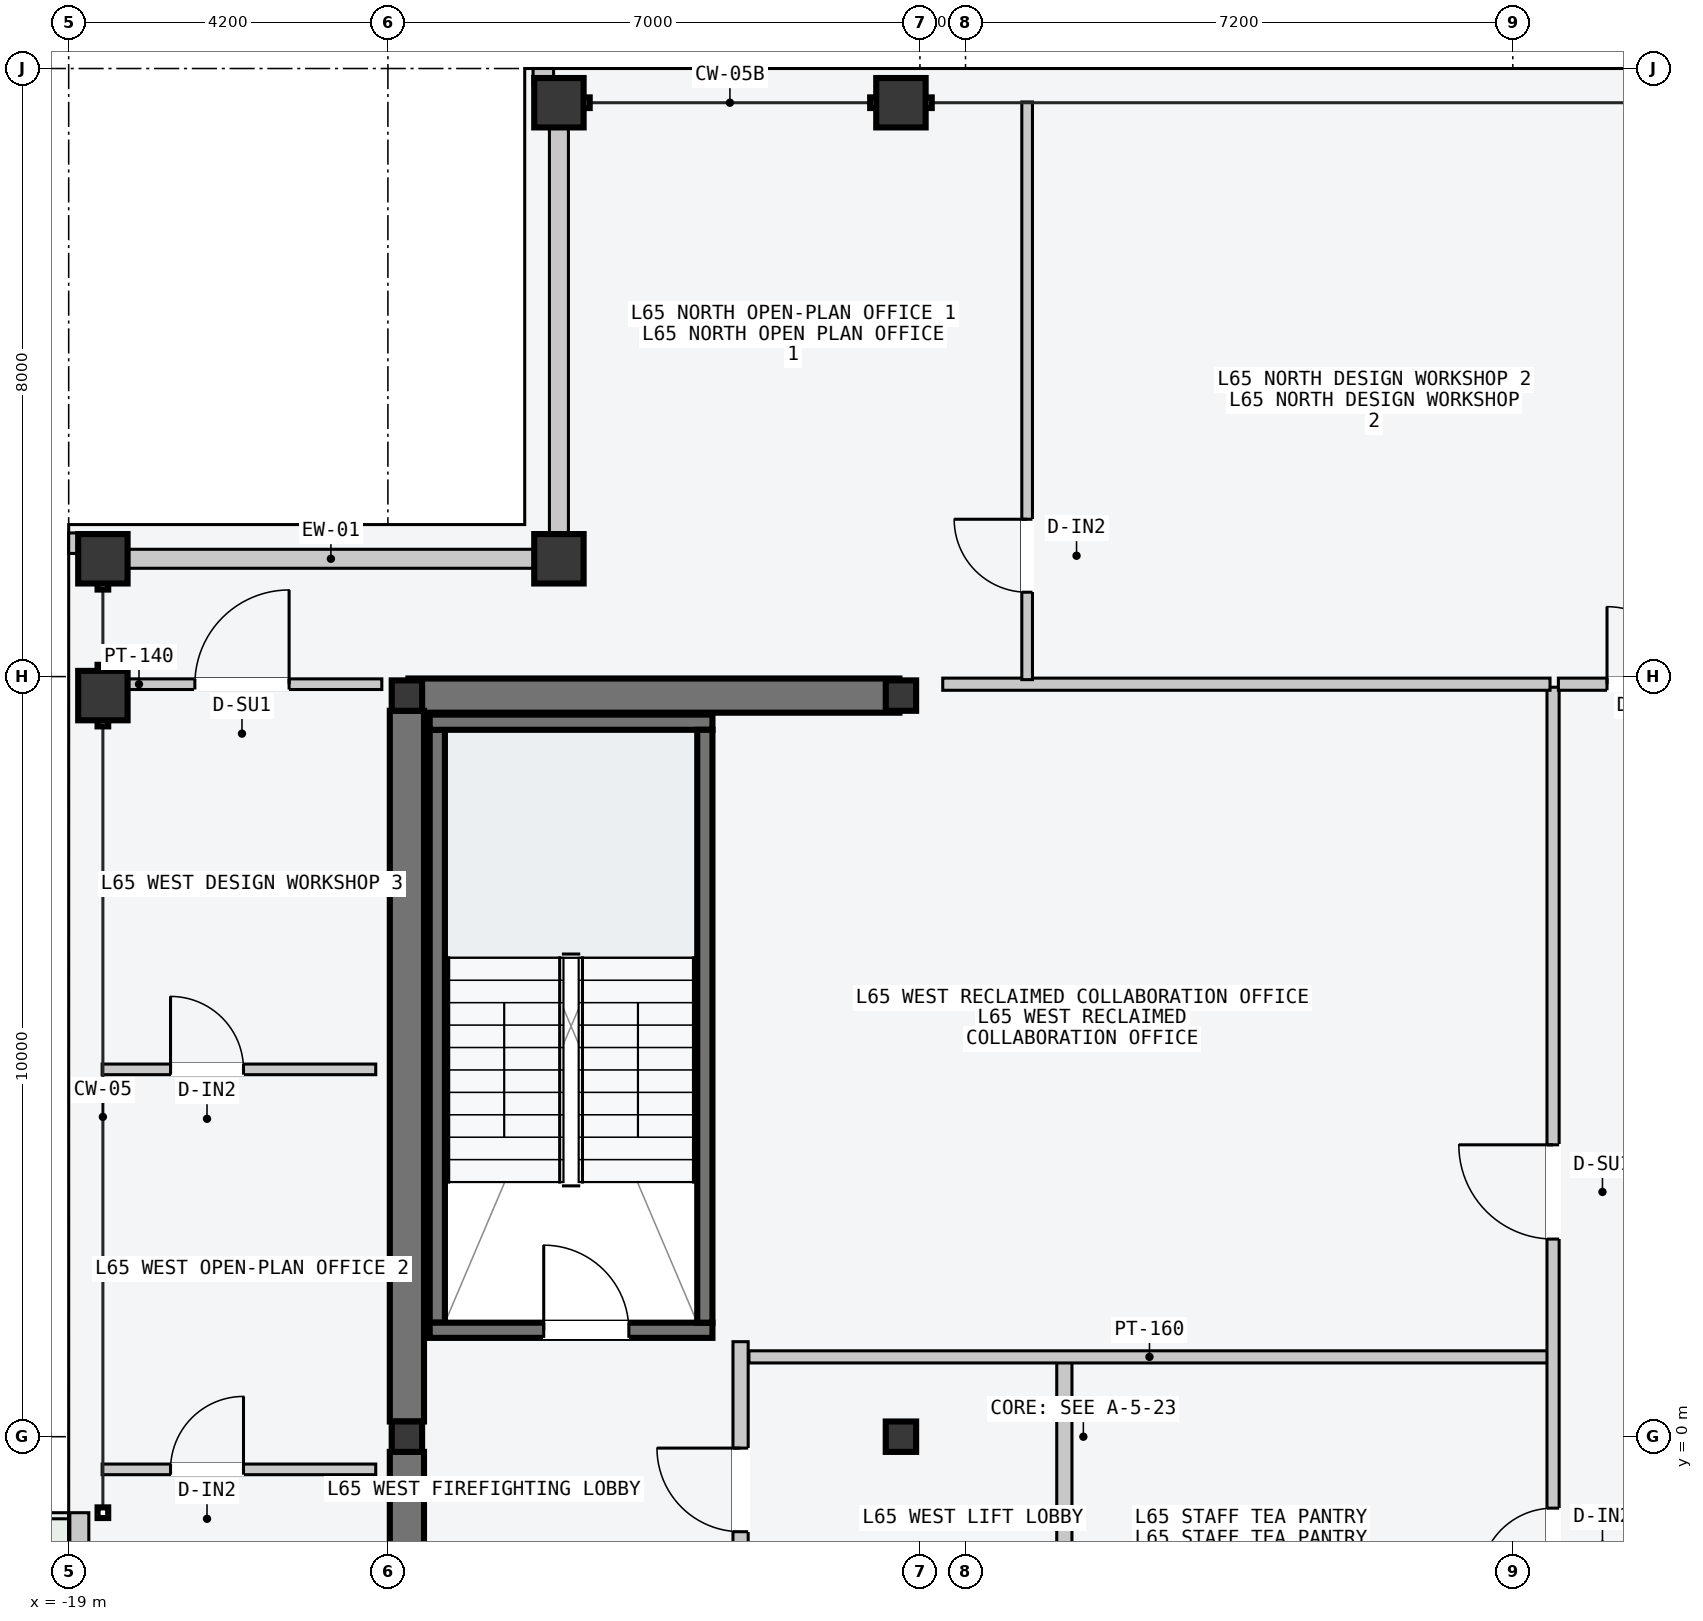
"""IFC4 building model, lengths in metres.
Left out: names, types, materials, properties, quantities, classifications, styles, units other than length and angle.
Written with IfcOpenShell. Run it as: python <this file> out.ifc"""

import sys

from ifc_helpers import new_model, si_unit, direction, frame, frame_2d, origin, origin_2d, place, context, subcontext, project, spatial, rectangle, hollow_rectangle, i_section, extrude, element, fill, save


model = new_model("IFC4")
c1 = context("Model", 3, precision=1e-05, world=origin(), true_north=direction((0.0, 1.0)))
c2 = subcontext(c1, "Body", "Model", "MODEL_VIEW")
j1 = project(units=[si_unit("LENGTHUNIT", "METRE"), si_unit("PLANEANGLEUNIT", "RADIAN")], contexts=[c1])
p1 = place(None, origin())
s1 = spatial("IfcSite", under=j1, at=p1, CompositionType="ELEMENT")
p2 = place(p1, origin())
s2 = spatial("IfcBuilding", under=s1, at=p2, CompositionType="ELEMENT")
p3 = place(p2, frame((0.0, 0.0, 247.2)))
s3 = spatial("IfcBuildingStorey", under=s2, at=p3, CompositionType="ELEMENT", Elevation=247.2)
p4 = place(p3, frame((-14.53, 9.75, -0.2), z_axis=(0.0, 0.0, 1.0), x_axis=(1.0, 0.0, 0.0)))
e1 = element("IfcWall", 1, at=p4, inside=s3, PredefinedType="SHEAR", context=c2, shape_type="SweptSolid", body=[
    extrude(rectangle(XDim=6.46, YDim=0.45, at=frame_2d((3.23, 0.0))), origin(), (0.0, 0.0, 1.0), 3.6),
])
for number, where, z_axis, x_axis in (
    (2, (-14.55, -9.55, -0.2), (0.0, 0.0, 1.0), (0.0, 1.0, 0.0)),
    (3, (-14.55, 0.2, -0.2), (0.0, 0.0, 1.0), (0.0, 1.0, 0.0)),
):
    element("IfcWall", number, at=place(p3, frame(where, z_axis=z_axis, x_axis=x_axis)), inside=s3, PredefinedType="SHEAR", context=c2, shape_type="SweptSolid", body=[
        extrude(rectangle(XDim=9.35, YDim=0.45, at=frame_2d((4.675, 0.0))), origin(), (0.0, 0.0, 1.0), 3.6),
    ])
p5 = place(p3, frame((-14.15, 1.5, -0.2), z_axis=(0.0, 0.0, 1.0), x_axis=(0.0, 1.0, 0.0)))
e4 = element("IfcWall", 4, at=p5, inside=s3, PredefinedType="SOLIDWALL", context=c2, shape_type="SweptSolid", body=[
    extrude(rectangle(XDim=7.8, YDim=0.2, at=frame_2d((3.9, 0.0))), origin(), (0.0, 0.0, 1.0), 3.6),
])
p6 = place(p3, frame((-14.25, 1.4, -0.2), z_axis=(0.0, 0.0, 1.0), x_axis=(1.0, 0.0, 0.0)))
e5 = element("IfcWall", 5, at=p6, inside=s3, PredefinedType="SOLIDWALL", context=c2, shape_type="SweptSolid", body=[
    extrude(rectangle(XDim=3.72, YDim=0.2, at=frame_2d((1.86, 0.0))), origin(), (0.0, 0.0, 1.0), 3.6),
])
p7 = place(p6, frame((1.5, 0.0, 0.2)))
e6 = element("IfcOpeningElement", 6, at=p7, cuts=e5, PredefinedType="OPENING", context=c2, shape_type="SweptSolid", body=[
    extrude(rectangle(XDim=1.12, YDim=2.18, at=frame_2d((0.56, 1.09))), frame((0.0, 0.11, 0.0), z_axis=(0.0, -1.0, 0.0), x_axis=(1.0, 0.0, 0.0)), (0.0, 0.0, 1.0), 0.22),
])
p8 = place(p3, frame((-14.25, 9.4, -0.2), z_axis=(0.0, 0.0, 1.0), x_axis=(1.0, 0.0, 0.0)))
e7 = element("IfcWall", 7, at=p8, inside=s3, PredefinedType="SOLIDWALL", context=c2, shape_type="SweptSolid", body=[
    extrude(rectangle(XDim=3.72, YDim=0.2, at=frame_2d((1.86, 0.0))), origin(), (0.0, 0.0, 1.0), 3.6),
])
p9 = place(p3, frame((-10.63, 1.5, -0.2), z_axis=(0.0, 0.0, 1.0), x_axis=(0.0, 1.0, 0.0)))
e8 = element("IfcWall", 8, at=p9, inside=s3, PredefinedType="SOLIDWALL", context=c2, shape_type="SweptSolid", body=[
    extrude(rectangle(XDim=7.8, YDim=0.2, at=frame_2d((3.9, 0.0))), origin(), (0.0, 0.0, 1.0), 3.6),
])
for number, where, z_axis, x_axis in (
    (9, (-14.55, 0.0, 0.0), (0.0, 0.0, 1.0), (1.0, 0.0, 0.0)),
    (10, (-14.55, 9.75, 0.0), (0.0, 0.0, 1.0), (1.0, 0.0, 0.0)),
    (11, (-8.05, 0.0, 0.0), (0.0, 0.0, 1.0), (1.0, 0.0, 0.0)),
    (12, (-8.05, 9.75, 0.0), (0.0, 0.0, 1.0), (1.0, 0.0, 0.0)),
):
    element("IfcColumn", number, at=place(p3, frame(where, z_axis=z_axis, x_axis=x_axis)), inside=s3, PredefinedType="COLUMN", context=c2, shape_type="SweptSolid", body=[
        extrude(i_section(OverallWidth=0.4, OverallDepth=0.4, WebThickness=0.013, FlangeThickness=0.021, at=origin_2d()), origin(), (0.0, 0.0, 1.0), 3.6),
    ])
for number, where, z_axis, x_axis in (
    (13, (-12.55, 17.55, 0.0), (0.0, 0.0, 1.0), (1.0, 0.0, 0.0)),
    (14, (-8.05, 17.55, 0.0), (0.0, 0.0, 1.0), (1.0, 0.0, 0.0)),
    (15, (-18.55, 9.75, 0.0), (0.0, 0.0, 1.0), (0.0, 1.0, 0.0)),
    (16, (-18.55, 11.55, 0.0), (0.0, 0.0, 1.0), (0.0, 1.0, 0.0)),
    (17, (-12.55, 11.55, 0.0), (0.0, 0.0, 1.0), (1.0, 0.0, 0.0)),
):
    element("IfcColumn", number, at=place(p3, frame(where, z_axis=z_axis, x_axis=x_axis)), inside=s3, PredefinedType="COLUMN", context=c2, shape_type="SweptSolid", body=[
        extrude(hollow_rectangle(XDim=0.65, YDim=0.65, WallThickness=0.028, at=origin_2d()), origin(), (0.0, 0.0, 1.0), 3.6),
    ])
p10 = place(p3, frame((-18.86, -9.405, 0.0), z_axis=(0.0, 0.0, 1.0), x_axis=(0.0, 1.0, 0.0)))
e18 = element("IfcWall", 18, at=p10, inside=s3, PredefinedType="STANDARD", context=c2, shape_type="SweptSolid", body=[
    extrude(rectangle(XDim=8.405, YDim=0.25, at=frame_2d((4.203, 0.0))), origin(), (0.0, 0.0, 1.0), 3.4),
])
p11 = place(p10, frame((5.605, 0.0, 0.0)))
e19 = element("IfcOpeningElement", 19, at=p11, cuts=e18, PredefinedType="OPENING", context=c2, shape_type="SweptSolid", body=[
    extrude(rectangle(XDim=1.6, YDim=2.2, at=frame_2d((0.8, 1.1))), frame((0.0, 0.135, 0.0), z_axis=(0.0, -1.0, 0.0), x_axis=(1.0, 0.0, 0.0)), (0.0, 0.0, 1.0), 0.27),
])
p12 = place(p10, frame((1.805, 0.0, 0.85)))
e20 = element("IfcOpeningElement", 20, at=p12, cuts=e18, PredefinedType="OPENING", context=c2, shape_type="SweptSolid", body=[
    extrude(rectangle(XDim=1.8, YDim=2.05, at=frame_2d((0.9, 1.025))), frame((0.0, 0.135, 0.0), z_axis=(0.0, -1.0, 0.0), x_axis=(1.0, 0.0, 0.0)), (0.0, 0.0, 1.0), 0.27),
])
for number, where, z_axis, x_axis in (
    (21, (-18.215, 11.55, 0.0), (0.0, 0.0, 1.0), (1.0, 0.0, 0.0)),
    (22, (-12.55, 11.885, 0.0), (0.0, 0.0, 1.0), (0.0, 1.0, 0.0)),
):
    element("IfcWall", number, at=place(p3, frame(where, z_axis=z_axis, x_axis=x_axis)), inside=s3, PredefinedType="STANDARD", context=c2, shape_type="SweptSolid", body=[
        extrude(rectangle(XDim=5.33, YDim=0.25, at=frame_2d((2.665, 0.0))), origin(), (0.0, 0.0, 1.0), 2.85),
    ])
for number, where, z_axis, x_axis in (
    (23, (-12.89, 17.89, 0.0), (0.0, 0.0, 1.0), (1.0, 0.0, 0.0)),
    (24, (-18.89, 11.62, 0.0), (0.0, 0.0, 1.0), (0.0, 1.0, 0.0)),
):
    element("IfcWall", number, at=place(p3, frame(where, z_axis=z_axis, x_axis=x_axis)), inside=s3, PredefinedType="PARAPET", context=c2, shape_type="SweptSolid", body=[
        extrude(rectangle(XDim=0.27, YDim=0.22, at=frame_2d((0.135, 0.0))), origin(), (0.0, 0.0, 1.0), 1.2),
    ])
p13 = place(p3, frame((-5.9, -9.45, 0.0), z_axis=(0.0, 0.0, 1.0), x_axis=(0.0, 1.0, 0.0)))
e25 = element("IfcWall", 25, at=p13, inside=s3, PredefinedType="PARTITIONING", context=c2, shape_type="SweptSolid", body=[
    extrude(rectangle(XDim=10.5, YDim=0.2, at=frame_2d((5.25, 0.0))), origin(), (0.0, 0.0, 1.0), 3.4),
])
p14 = place(p13, frame((3.9, 0.0, 0.0)))
e26 = element("IfcOpeningElement", 26, at=p14, cuts=e25, PredefinedType="OPENING", context=c2, shape_type="SweptSolid", body=[
    extrude(rectangle(XDim=1.5, YDim=2.2, at=frame_2d((0.75, 1.1))), frame((0.0, 0.11, 0.0), z_axis=(0.0, -1.0, 0.0), x_axis=(1.0, 0.0, 0.0)), (0.0, 0.0, 1.0), 0.22),
])
p15 = place(p3, frame((-10.16, -2.55, 0.0), z_axis=(0.0, 0.0, 1.0), x_axis=(0.0, 1.0, 0.0)))
e27 = element("IfcWall", 27, at=p15, inside=s3, PredefinedType="PARTITIONING", context=c2, shape_type="SweptSolid", body=[
    extrude(rectangle(XDim=3.8, YDim=0.2, at=frame_2d((1.9, 0.0))), origin(), (0.0, 0.0, 1.0), 3.4),
])
p16 = place(p15, frame((1.3, 0.0, 0.0)))
e28 = element("IfcOpeningElement", 28, at=p16, cuts=e27, PredefinedType="OPENING", context=c2, shape_type="SweptSolid", body=[
    extrude(rectangle(XDim=1.1, YDim=2.15, at=frame_2d((0.55, 1.075))), frame((0.0, 0.11, 0.0), z_axis=(0.0, -1.0, 0.0), x_axis=(1.0, 0.0, 0.0)), (0.0, 0.0, 1.0), 0.22),
])
p17 = place(p3, frame((-10.05, 1.05, 0.0), z_axis=(0.0, 0.0, 1.0), x_axis=(1.0, 0.0, 0.0)))
e29 = element("IfcWall", 29, at=p17, inside=s3, PredefinedType="PARTITIONING", context=c2, shape_type="SweptSolid", body=[
    extrude(rectangle(XDim=10.54, YDim=0.16, at=frame_2d((5.27, 0.0))), origin(), (0.0, 0.0, 1.0), 3.4),
])
p18 = place(p3, frame((0.53, -3.5, 0.0), z_axis=(0.0, 0.0, 1.0), x_axis=(0.0, 1.0, 0.0)))
e30 = element("IfcWall", 30, at=p18, inside=s3, PredefinedType="PARTITIONING", context=c2, shape_type="SweptSolid", body=[
    extrude(rectangle(XDim=13.36, YDim=0.16, at=frame_2d((6.68, 0.0))), origin(), (0.0, 0.0, 1.0), 3.4),
])
p19 = place(p18, frame((6.1, 0.0, 0.0)))
e31 = element("IfcOpeningElement", 31, at=p19, cuts=e30, PredefinedType="OPENING", context=c2, shape_type="SweptSolid", body=[
    extrude(rectangle(XDim=1.24, YDim=2.24, at=frame_2d((0.62, 1.12))), frame((0.0, 0.09, 0.0), z_axis=(0.0, -1.0, 0.0), x_axis=(1.0, 0.0, 0.0)), (0.0, 0.0, 1.0), 0.18),
])
p20 = place(p18, frame((1.6, 0.0, 0.0)))
e32 = element("IfcOpeningElement", 32, at=p20, cuts=e30, PredefinedType="OPENING", context=c2, shape_type="SweptSolid", body=[
    extrude(rectangle(XDim=0.96, YDim=2.18, at=frame_2d((0.48, 1.09))), frame((0.0, 0.09, 0.0), z_axis=(0.0, -1.0, 0.0), x_axis=(1.0, 0.0, 0.0)), (0.0, 0.0, 1.0), 0.18),
])
p21 = place(p3, frame((-7.5, 9.9, 0.0), z_axis=(0.0, 0.0, 1.0), x_axis=(1.0, 0.0, 0.0)))
e33 = element("IfcWall", 33, at=p21, inside=s3, PredefinedType="PARTITIONING", context=c2, shape_type="SweptSolid", body=[
    extrude(rectangle(XDim=7.99, YDim=0.16, at=frame_2d((3.995, 0.0))), origin(), (0.0, 0.0, 1.0), 3.4),
])
p22 = place(p3, frame((-6.39, 9.96, 0.0), z_axis=(0.0, 0.0, 1.0), x_axis=(0.0, 1.0, 0.0)))
e34 = element("IfcWall", 34, at=p22, inside=s3, PredefinedType="PARTITIONING", context=c2, shape_type="SweptSolid", body=[
    extrude(rectangle(XDim=7.6, YDim=0.14, at=frame_2d((3.8, 0.0))), origin(), (0.0, 0.0, 1.0), 3.4),
])
p23 = place(p22, frame((1.15, 0.0, 0.0)))
e35 = element("IfcOpeningElement", 35, at=p23, cuts=e34, PredefinedType="OPENING", context=c2, shape_type="SweptSolid", body=[
    extrude(rectangle(XDim=0.96, YDim=2.18, at=frame_2d((0.48, 1.09))), frame((0.0, 0.08, 0.0), z_axis=(0.0, -1.0, 0.0), x_axis=(1.0, 0.0, 0.0)), (0.0, 0.0, 1.0), 0.16),
])
p24 = place(p3, frame((0.6, 9.9, 0.0), z_axis=(0.0, 0.0, 1.0), x_axis=(1.0, 0.0, 0.0)))
e36 = element("IfcWall", 36, at=p24, inside=s3, PredefinedType="PARTITIONING", context=c2, shape_type="SweptSolid", body=[
    extrude(rectangle(XDim=2.3, YDim=0.16, at=frame_2d((1.15, 0.0))), origin(), (0.0, 0.0, 1.0), 3.4),
])
p25 = place(p24, frame((0.64, 0.0, 0.0)))
e37 = element("IfcOpeningElement", 37, at=p25, cuts=e36, PredefinedType="OPENING", context=c2, shape_type="SweptSolid", body=[
    extrude(rectangle(XDim=1.02, YDim=2.2, at=frame_2d((0.51, 1.1))), frame((0.0, 0.09, 0.0), z_axis=(0.0, -1.0, 0.0), x_axis=(1.0, 0.0, 0.0)), (0.0, 0.0, 1.0), 0.18),
])
p26 = place(p3, frame((-18.56, 9.9, 0.0), z_axis=(0.0, 0.0, 1.0), x_axis=(1.0, 0.0, 0.0)))
e38 = element("IfcWall", 38, at=p26, inside=s3, PredefinedType="PARTITIONING", context=c2, shape_type="SweptSolid", body=[
    extrude(rectangle(XDim=3.68, YDim=0.14, at=frame_2d((1.84, 0.0))), origin(), (0.0, 0.0, 1.0), 3.4),
])
p27 = place(p26, frame((1.22, 0.0, 0.0)))
e39 = element("IfcOpeningElement", 39, at=p27, cuts=e38, PredefinedType="OPENING", context=c2, shape_type="SweptSolid", body=[
    extrude(rectangle(XDim=1.24, YDim=2.24, at=frame_2d((0.62, 1.12))), frame((0.0, 0.08, 0.0), z_axis=(0.0, -1.0, 0.0), x_axis=(1.0, 0.0, 0.0)), (0.0, 0.0, 1.0), 0.16),
])
p28 = place(p3, frame((-18.56, -0.43, 0.0), z_axis=(0.0, 0.0, 1.0), x_axis=(1.0, 0.0, 0.0)))
e40 = element("IfcWall", 40, at=p28, inside=s3, PredefinedType="PARTITIONING", context=c2, shape_type="SweptSolid", body=[
    extrude(rectangle(XDim=3.6, YDim=0.14, at=frame_2d((1.8, 0.0))), origin(), (0.0, 0.0, 1.0), 3.4),
])
p29 = place(p28, frame((0.9, 0.0, 0.0)))
e41 = element("IfcOpeningElement", 41, at=p29, cuts=e40, PredefinedType="OPENING", context=c2, shape_type="SweptSolid", body=[
    extrude(rectangle(XDim=0.96, YDim=2.18, at=frame_2d((0.48, 1.09))), frame((0.0, 0.08, 0.0), z_axis=(0.0, -1.0, 0.0), x_axis=(1.0, 0.0, 0.0)), (0.0, 0.0, 1.0), 0.16),
])
p30 = place(p3, frame((-18.56, 4.833, 0.0), z_axis=(0.0, 0.0, 1.0), x_axis=(1.0, 0.0, 0.0)))
e42 = element("IfcWall", 42, at=p30, inside=s3, PredefinedType="PARTITIONING", context=c2, shape_type="SweptSolid", body=[
    extrude(rectangle(XDim=3.6, YDim=0.14, at=frame_2d((1.8, 0.0))), origin(), (0.0, 0.0, 1.0), 3.4),
])
p31 = place(p30, frame((0.9, 0.0, 0.0)))
e43 = element("IfcOpeningElement", 43, at=p31, cuts=e42, PredefinedType="OPENING", context=c2, shape_type="SweptSolid", body=[
    extrude(rectangle(XDim=0.96, YDim=2.18, at=frame_2d((0.48, 1.09))), frame((0.0, 0.08, 0.0), z_axis=(0.0, -1.0, 0.0), x_axis=(1.0, 0.0, 0.0)), (0.0, 0.0, 1.0), 0.16),
])
p32 = place(p7, origin())
e44 = element("IfcDoor", 44, at=p32, inside=s3, OperationType="SINGLE_SWING_LEFT", PredefinedType="DOOR", context=c2, shape_type="SweptSolid", body=[
    extrude(rectangle(XDim=1.12, YDim=2.18, at=frame_2d((0.56, 1.09))), frame((0.0, 0.025, 0.0), z_axis=(0.0, -1.0, 0.0), x_axis=(1.0, 0.0, 0.0)), (0.0, 0.0, 1.0), 0.05),
])
fill(e6, e44)
p33 = place(p16, origin())
e45 = element("IfcDoor", 45, at=p33, inside=s3, OperationType="SINGLE_SWING_RIGHT", PredefinedType="DOOR", context=c2, shape_type="SweptSolid", body=[
    extrude(rectangle(XDim=1.1, YDim=2.15, at=frame_2d((0.55, 1.075))), frame((0.0, 0.025, 0.0), z_axis=(0.0, -1.0, 0.0), x_axis=(1.0, 0.0, 0.0)), (0.0, 0.0, 1.0), 0.05),
])
fill(e28, e45)
p34 = place(p19, origin())
e46 = element("IfcDoor", 46, at=p34, inside=s3, OperationType="SINGLE_SWING_RIGHT", PredefinedType="DOOR", context=c2, shape_type="SweptSolid", body=[
    extrude(rectangle(XDim=1.24, YDim=2.24, at=frame_2d((0.62, 1.12))), frame((0.0, 0.025, 0.0), z_axis=(0.0, -1.0, 0.0), x_axis=(1.0, 0.0, 0.0)), (0.0, 0.0, 1.0), 0.05),
])
fill(e31, e46)
p35 = place(p20, origin())
e47 = element("IfcDoor", 47, at=p35, inside=s3, OperationType="SINGLE_SWING_LEFT", PredefinedType="DOOR", context=c2, shape_type="SweptSolid", body=[
    extrude(rectangle(XDim=0.96, YDim=2.18, at=frame_2d((0.48, 1.09))), frame((0.0, 0.025, 0.0), z_axis=(0.0, -1.0, 0.0), x_axis=(1.0, 0.0, 0.0)), (0.0, 0.0, 1.0), 0.05),
])
fill(e32, e47)
p36 = place(p23, origin())
e48 = element("IfcDoor", 48, at=p36, inside=s3, OperationType="SINGLE_SWING_RIGHT", PredefinedType="DOOR", context=c2, shape_type="SweptSolid", body=[
    extrude(rectangle(XDim=0.96, YDim=2.18, at=frame_2d((0.48, 1.09))), frame((0.0, 0.025, 0.0), z_axis=(0.0, -1.0, 0.0), x_axis=(1.0, 0.0, 0.0)), (0.0, 0.0, 1.0), 0.05),
])
fill(e35, e48)
p37 = place(p25, origin())
e49 = element("IfcDoor", 49, at=p37, inside=s3, OperationType="SINGLE_SWING_LEFT", PredefinedType="DOOR", context=c2, shape_type="SweptSolid", body=[
    extrude(rectangle(XDim=1.02, YDim=2.2, at=frame_2d((0.51, 1.1))), frame((0.0, 0.025, 0.0), z_axis=(0.0, -1.0, 0.0), x_axis=(1.0, 0.0, 0.0)), (0.0, 0.0, 1.0), 0.05),
])
fill(e37, e49)
p38 = place(p27, origin())
e50 = element("IfcDoor", 50, at=p38, inside=s3, OperationType="SINGLE_SWING_RIGHT", PredefinedType="DOOR", context=c2, shape_type="SweptSolid", body=[
    extrude(rectangle(XDim=1.24, YDim=2.24, at=frame_2d((0.62, 1.12))), frame((0.0, 0.025, 0.0), z_axis=(0.0, -1.0, 0.0), x_axis=(1.0, 0.0, 0.0)), (0.0, 0.0, 1.0), 0.05),
])
fill(e39, e50)
p39 = place(p29, origin())
e51 = element("IfcDoor", 51, at=p39, inside=s3, OperationType="SINGLE_SWING_RIGHT", PredefinedType="DOOR", context=c2, shape_type="SweptSolid", body=[
    extrude(rectangle(XDim=0.96, YDim=2.18, at=frame_2d((0.48, 1.09))), frame((0.0, 0.025, 0.0), z_axis=(0.0, -1.0, 0.0), x_axis=(1.0, 0.0, 0.0)), (0.0, 0.0, 1.0), 0.05),
])
fill(e41, e51)
p40 = place(p31, origin())
e52 = element("IfcDoor", 52, at=p40, inside=s3, OperationType="SINGLE_SWING_LEFT", PredefinedType="DOOR", context=c2, shape_type="SweptSolid", body=[
    extrude(rectangle(XDim=0.96, YDim=2.18, at=frame_2d((0.48, 1.09))), frame((0.0, 0.025, 0.0), z_axis=(0.0, -1.0, 0.0), x_axis=(1.0, 0.0, 0.0)), (0.0, 0.0, 1.0), 0.05),
])
fill(e43, e52)
save(model, sys.argv[1])
